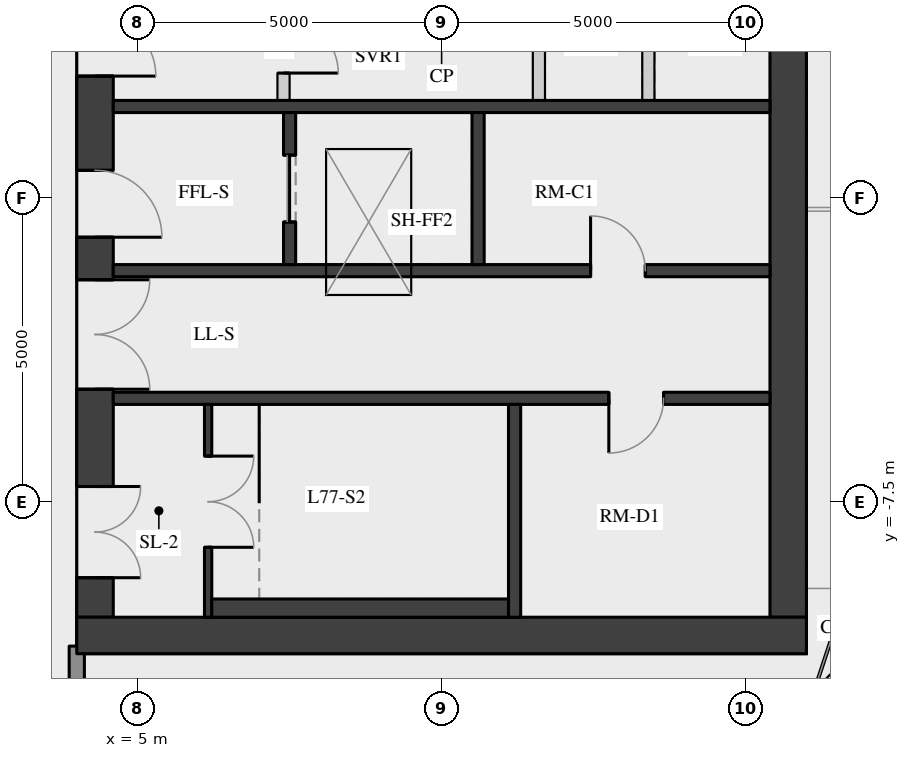
"""IFC4 building model, lengths in metres.
Left out: names, types, materials, properties, quantities, classifications, styles, units other than length and angle.
Written with IfcOpenShell. Run it as: python <this file> out.ifc"""

import sys

from ifc_helpers import new_model, si_unit, direction, frame, frame_2d, origin, place, context, subcontext, project, spatial, rectangle, extrude, element, fill, save


model = new_model("IFC4")
c1 = context("Model", 3, precision=1e-05, world=origin(), true_north=direction((0.0, 1.0)))
c2 = subcontext(c1, "Body", "Model", "MODEL_VIEW")
j1 = project(units=[si_unit("LENGTHUNIT", "METRE"), si_unit("PLANEANGLEUNIT", "RADIAN")], contexts=[c1])
p1 = place(None, origin())
s1 = spatial("IfcSite", under=j1, at=p1, CompositionType="ELEMENT")
p2 = place(p1, origin())
s2 = spatial("IfcBuilding", under=s1, at=p2, CompositionType="ELEMENT")
p3 = place(p2, frame((0.0, 0.0, 275.2)))
s3 = spatial("IfcBuildingStorey", under=s2, at=p3, CompositionType="ELEMENT", Elevation=275.2)
p4 = place(p3, frame((4.3, -9.4, 0.0), z_axis=(0.0, 0.0, 1.0), x_axis=(0.0, 1.0, 0.0)))
e1 = element("IfcWall", 1, at=p4, inside=s3, PredefinedType="SHEAR", context=c2, shape_type="SweptSolid", body=[
    extrude(rectangle(XDim=18.8, YDim=0.6, at=frame_2d((9.4, 0.0))), origin(), (0.0, 0.0, 1.0), 5.0),
])
p5 = place(p4, frame((0.65, 0.0, 0.0)))
e2 = element("IfcOpeningElement", 2, at=p5, cuts=e1, PredefinedType="OPENING", context=c2, shape_type="SweptSolid", body=[
    extrude(rectangle(XDim=1.5, YDim=2.1, at=frame_2d((0.75, 1.05))), frame((0.0, 0.31, 0.0), z_axis=(0.0, -1.0, 0.0), x_axis=(1.0, 0.0, 0.0)), (0.0, 0.0, 1.0), 0.62),
])
p6 = place(p4, frame((3.75, 0.0, 0.0)))
e3 = element("IfcOpeningElement", 3, at=p6, cuts=e1, PredefinedType="OPENING", context=c2, shape_type="SweptSolid", body=[
    extrude(rectangle(XDim=1.8, YDim=2.1, at=frame_2d((0.9, 1.05))), frame((0.0, 0.31, 0.0), z_axis=(0.0, -1.0, 0.0), x_axis=(1.0, 0.0, 0.0)), (0.0, 0.0, 1.0), 0.62),
])
p7 = place(p4, frame((6.25, 0.0, 0.0)))
e4 = element("IfcOpeningElement", 4, at=p7, cuts=e1, PredefinedType="OPENING", context=c2, shape_type="SweptSolid", body=[
    extrude(rectangle(XDim=1.1, YDim=2.1, at=frame_2d((0.55, 1.05))), frame((0.0, 0.31, 0.0), z_axis=(0.0, -1.0, 0.0), x_axis=(1.0, 0.0, 0.0)), (0.0, 0.0, 1.0), 0.62),
])
p8 = place(p4, frame((8.9, 0.0, 0.0)))
e5 = element("IfcOpeningElement", 5, at=p8, cuts=e1, PredefinedType="OPENING", context=c2, shape_type="SweptSolid", body=[
    extrude(rectangle(XDim=1.0, YDim=2.1, at=frame_2d((0.5, 1.05))), frame((0.0, 0.31, 0.0), z_axis=(0.0, -1.0, 0.0), x_axis=(1.0, 0.0, 0.0)), (0.0, 0.0, 1.0), 0.62),
])
p9 = place(p4, frame((11.45, 0.0, 0.0)))
e6 = element("IfcOpeningElement", 6, at=p9, cuts=e1, PredefinedType="OPENING", context=c2, shape_type="SweptSolid", body=[
    extrude(rectangle(XDim=1.1, YDim=2.1, at=frame_2d((0.55, 1.05))), frame((0.0, 0.31, 0.0), z_axis=(0.0, -1.0, 0.0), x_axis=(1.0, 0.0, 0.0)), (0.0, 0.0, 1.0), 0.62),
])
p10 = place(p4, frame((13.25, 0.0, 0.0)))
e7 = element("IfcOpeningElement", 7, at=p10, cuts=e1, PredefinedType="OPENING", context=c2, shape_type="SweptSolid", body=[
    extrude(rectangle(XDim=1.8, YDim=2.1, at=frame_2d((0.9, 1.05))), frame((0.0, 0.31, 0.0), z_axis=(0.0, -1.0, 0.0), x_axis=(1.0, 0.0, 0.0)), (0.0, 0.0, 1.0), 0.62),
])
p11 = place(p4, frame((16.65, 0.0, 0.0)))
e8 = element("IfcOpeningElement", 8, at=p11, cuts=e1, PredefinedType="OPENING", context=c2, shape_type="SweptSolid", body=[
    extrude(rectangle(XDim=1.5, YDim=2.1, at=frame_2d((0.75, 1.05))), frame((0.0, 0.31, 0.0), z_axis=(0.0, -1.0, 0.0), x_axis=(1.0, 0.0, 0.0)), (0.0, 0.0, 1.0), 0.62),
])
p12 = place(p3, frame((15.7, -9.4, 0.0), z_axis=(0.0, 0.0, 1.0), x_axis=(0.0, 1.0, 0.0)))
e9 = element("IfcWall", 9, at=p12, inside=s3, PredefinedType="SHEAR", context=c2, shape_type="SweptSolid", body=[
    extrude(rectangle(XDim=18.8, YDim=0.6, at=frame_2d((9.4, 0.0))), origin(), (0.0, 0.0, 1.0), 5.0),
])
p13 = place(p3, frame((4.0, -9.7, 0.0), z_axis=(0.0, 0.0, 1.0), x_axis=(1.0, 0.0, 0.0)))
e10 = element("IfcWall", 10, at=p13, inside=s3, PredefinedType="SHEAR", context=c2, shape_type="SweptSolid", body=[
    extrude(rectangle(XDim=12.0, YDim=0.6, at=frame_2d((6.0, 0.0))), origin(), (0.0, 0.0, 1.0), 5.0),
])
p14 = place(p3, frame((4.6, -1.0, 0.0), z_axis=(0.0, 0.0, 1.0), x_axis=(1.0, 0.0, 0.0)))
e11 = element("IfcWall", 11, at=p14, inside=s3, PredefinedType="SHEAR", context=c2, shape_type="SweptSolid", body=[
    extrude(rectangle(XDim=10.8, YDim=0.2, at=frame_2d((5.4, 0.0))), origin(), (0.0, 0.0, 1.0), 5.0),
])
p15 = place(p3, frame((4.6, -3.7, 0.0), z_axis=(0.0, 0.0, 1.0), x_axis=(1.0, 0.0, 0.0)))
e12 = element("IfcWall", 12, at=p15, inside=s3, PredefinedType="SHEAR", context=c2, shape_type="SweptSolid", body=[
    extrude(rectangle(XDim=10.8, YDim=0.2, at=frame_2d((5.4, 0.0))), origin(), (0.0, 0.0, 1.0), 5.0),
])
p16 = place(p15, frame((7.85, 0.0, 0.0)))
e13 = element("IfcOpeningElement", 13, at=p16, cuts=e12, PredefinedType="OPENING", context=c2, shape_type="SweptSolid", body=[
    extrude(rectangle(XDim=0.9, YDim=2.1, at=frame_2d((0.45, 1.05))), frame((0.0, 0.11, 0.0), z_axis=(0.0, -1.0, 0.0), x_axis=(1.0, 0.0, 0.0)), (0.0, 0.0, 1.0), 0.22),
])
p17 = place(p3, frame((4.6, -5.8, 0.0), z_axis=(0.0, 0.0, 1.0), x_axis=(1.0, 0.0, 0.0)))
e14 = element("IfcWall", 14, at=p17, inside=s3, PredefinedType="SHEAR", context=c2, shape_type="SweptSolid", body=[
    extrude(rectangle(XDim=10.8, YDim=0.2, at=frame_2d((5.4, 0.0))), origin(), (0.0, 0.0, 1.0), 5.0),
])
p18 = place(p17, frame((8.15, 0.0, 0.0)))
e15 = element("IfcOpeningElement", 15, at=p18, cuts=e14, PredefinedType="OPENING", context=c2, shape_type="SweptSolid", body=[
    extrude(rectangle(XDim=0.9, YDim=2.1, at=frame_2d((0.45, 1.05))), frame((0.0, 0.11, 0.0), z_axis=(0.0, -1.0, 0.0), x_axis=(1.0, 0.0, 0.0)), (0.0, 0.0, 1.0), 0.22),
])
p19 = place(p3, frame((11.2, -9.4, 0.0), z_axis=(0.0, 0.0, 1.0), x_axis=(0.0, 1.0, 0.0)))
e16 = element("IfcWall", 16, at=p19, inside=s3, PredefinedType="SHEAR", context=c2, shape_type="SweptSolid", body=[
    extrude(rectangle(XDim=3.5, YDim=0.2, at=frame_2d((1.75, 0.0))), origin(), (0.0, 0.0, 1.0), 5.0),
])
p20 = place(p3, frame((7.5, -3.6, 0.0), z_axis=(0.0, 0.0, 1.0), x_axis=(0.0, 1.0, 0.0)))
e17 = element("IfcWall", 17, at=p20, inside=s3, PredefinedType="SHEAR", context=c2, shape_type="SweptSolid", body=[
    extrude(rectangle(XDim=2.5, YDim=0.2, at=frame_2d((1.25, 0.0))), origin(), (0.0, 0.0, 1.0), 5.0),
])
p21 = place(p20, frame((0.7, 0.0, 0.0)))
e18 = element("IfcOpeningElement", 18, at=p21, cuts=e17, PredefinedType="OPENING", context=c2, shape_type="SweptSolid", body=[
    extrude(rectangle(XDim=1.1, YDim=2.1, at=frame_2d((0.55, 1.05))), frame((0.0, 0.11, 0.0), z_axis=(0.0, -1.0, 0.0), x_axis=(1.0, 0.0, 0.0)), (0.0, 0.0, 1.0), 0.22),
])
p22 = place(p3, frame((10.6, -3.6, 0.0), z_axis=(0.0, 0.0, 1.0), x_axis=(0.0, 1.0, 0.0)))
e19 = element("IfcWall", 19, at=p22, inside=s3, PredefinedType="SHEAR", context=c2, shape_type="SweptSolid", body=[
    extrude(rectangle(XDim=2.5, YDim=0.2, at=frame_2d((1.25, 0.0))), origin(), (0.0, 0.0, 1.0), 5.0),
])
p23 = place(p3, frame((6.16, -9.4, 0.0), z_axis=(0.0, 0.0, 1.0), x_axis=(0.0, 1.0, 0.0)))
e20 = element("IfcWall", 20, at=p23, inside=s3, PredefinedType="SHEAR", context=c2, shape_type="SweptSolid", body=[
    extrude(rectangle(XDim=3.5, YDim=0.12, at=frame_2d((1.75, 0.0))), origin(), (0.0, 0.0, 1.0), 5.0),
])
p24 = place(p23, frame((1.15, 0.0, 0.0)))
e21 = element("IfcOpeningElement", 21, at=p24, cuts=e20, PredefinedType="OPENING", context=c2, shape_type="SweptSolid", body=[
    extrude(rectangle(XDim=1.5, YDim=2.1, at=frame_2d((0.75, 1.05))), frame((0.0, 0.07, 0.0), z_axis=(0.0, -1.0, 0.0), x_axis=(1.0, 0.0, 0.0)), (0.0, 0.0, 1.0), 0.14),
])
p25 = place(p3, frame((7.4, -0.9, 0.0), z_axis=(0.0, 0.0, 1.0), x_axis=(0.0, 1.0, 0.0)))
e22 = element("IfcWall", 22, at=p25, inside=s3, PredefinedType="PARTITIONING", context=c2, shape_type="SweptSolid", body=[
    extrude(rectangle(XDim=1.8, YDim=0.2, at=frame_2d((0.9, 0.0))), origin(), (0.0, 0.0, 1.0), 5.0),
])
p26 = place(p25, frame((0.45, 0.0, 0.0)))
e23 = element("IfcOpeningElement", 23, at=p26, cuts=e22, PredefinedType="OPENING", context=c2, shape_type="SweptSolid", body=[
    extrude(rectangle(XDim=0.9, YDim=2.1, at=frame_2d((0.45, 1.05))), frame((0.0, 0.11, 0.0), z_axis=(0.0, -1.0, 0.0), x_axis=(1.0, 0.0, 0.0)), (0.0, 0.0, 1.0), 0.22),
])
for number, where, z_axis, x_axis in (
    (24, (11.6, -0.9, 0.0), (0.0, 0.0, 1.0), (0.0, 1.0, 0.0)),
    (25, (13.4, -0.9, 0.0), (0.0, 0.0, 1.0), (0.0, 1.0, 0.0)),
):
    element("IfcWall", number, at=place(p3, frame(where, z_axis=z_axis, x_axis=x_axis)), inside=s3, PredefinedType="PARTITIONING", context=c2, shape_type="SweptSolid", body=[
        extrude(rectangle(XDim=1.8, YDim=0.2, at=frame_2d((0.9, 0.0))), origin(), (0.0, 0.0, 1.0), 5.0),
    ])
p27 = place(p3, frame((6.22, -9.25, 0.0), z_axis=(0.0, 0.0, 1.0), x_axis=(1.0, 0.0, 0.0)))
e26 = element("IfcWall", 26, at=p27, inside=s3, PredefinedType="PARTITIONING", context=c2, shape_type="SweptSolid", body=[
    extrude(rectangle(XDim=4.88, YDim=0.3, at=frame_2d((2.44, 0.0))), origin(), (0.0, 0.0, 1.0), 5.0),
])
p28 = place(p3, frame((4.0, -13.875, 0.0), z_axis=(0.0, 0.0, 1.0), x_axis=(0.0, 1.0, 0.0)))
e27 = element("IfcWall", 27, at=p28, inside=s3, PredefinedType="PARTITIONING", context=c2, shape_type="SweptSolid", body=[
    extrude(rectangle(XDim=4.0, YDim=0.25, at=frame_2d((2.0, 0.0))), origin(), (0.0, 0.0, 1.0), 6.0),
])
p29 = place(p5, origin())
e28 = element("IfcDoor", 28, at=p29, inside=s3, OperationType="DOUBLE_DOOR_SINGLE_SWING", PredefinedType="DOOR", context=c2, shape_type="SweptSolid", body=[
    extrude(rectangle(XDim=1.5, YDim=2.1, at=frame_2d((0.75, 1.05))), frame((0.0, 0.025, 0.0), z_axis=(0.0, -1.0, 0.0), x_axis=(1.0, 0.0, 0.0)), (0.0, 0.0, 1.0), 0.05),
])
fill(e2, e28)
p30 = place(p6, origin())
e29 = element("IfcDoor", 29, at=p30, inside=s3, OperationType="DOUBLE_DOOR_SINGLE_SWING", PredefinedType="DOOR", context=c2, shape_type="SweptSolid", body=[
    extrude(rectangle(XDim=1.8, YDim=2.1, at=frame_2d((0.9, 1.05))), frame((0.0, 0.025, 0.0), z_axis=(0.0, -1.0, 0.0), x_axis=(1.0, 0.0, 0.0)), (0.0, 0.0, 1.0), 0.05),
])
fill(e3, e29)
p31 = place(p7, origin())
e30 = element("IfcDoor", 30, at=p31, inside=s3, OperationType="SINGLE_SWING_RIGHT", PredefinedType="DOOR", context=c2, shape_type="SweptSolid", body=[
    extrude(rectangle(XDim=1.1, YDim=2.1, at=frame_2d((0.55, 1.05))), frame((0.0, 0.025, 0.0), z_axis=(0.0, -1.0, 0.0), x_axis=(1.0, 0.0, 0.0)), (0.0, 0.0, 1.0), 0.05),
])
fill(e4, e30)
p32 = place(p8, origin())
e31 = element("IfcDoor", 31, at=p32, inside=s3, OperationType="SINGLE_SWING_RIGHT", PredefinedType="DOOR", context=c2, shape_type="SweptSolid", body=[
    extrude(rectangle(XDim=1.0, YDim=2.1, at=frame_2d((0.5, 1.05))), frame((0.0, 0.025, 0.0), z_axis=(0.0, -1.0, 0.0), x_axis=(1.0, 0.0, 0.0)), (0.0, 0.0, 1.0), 0.05),
])
fill(e5, e31)
p33 = place(p24, origin())
e32 = element("IfcDoor", 32, at=p33, inside=s3, OperationType="DOUBLE_DOOR_SINGLE_SWING", PredefinedType="DOOR", context=c2, shape_type="SweptSolid", body=[
    extrude(rectangle(XDim=1.5, YDim=2.1, at=frame_2d((0.75, 1.05))), frame((0.0, 0.025, 0.0), z_axis=(0.0, -1.0, 0.0), x_axis=(1.0, 0.0, 0.0)), (0.0, 0.0, 1.0), 0.05),
])
fill(e21, e32)
p34 = place(p16, origin())
e33 = element("IfcDoor", 33, at=p34, inside=s3, OperationType="SINGLE_SWING_LEFT", PredefinedType="DOOR", context=c2, shape_type="SweptSolid", body=[
    extrude(rectangle(XDim=0.9, YDim=2.1, at=frame_2d((0.45, 1.05))), frame((0.0, 0.025, 0.0), z_axis=(0.0, -1.0, 0.0), x_axis=(1.0, 0.0, 0.0)), (0.0, 0.0, 1.0), 0.05),
])
fill(e13, e33)
p35 = place(p18, origin())
e34 = element("IfcDoor", 34, at=p35, inside=s3, OperationType="SINGLE_SWING_RIGHT", PredefinedType="DOOR", context=c2, shape_type="SweptSolid", body=[
    extrude(rectangle(XDim=0.9, YDim=2.1, at=frame_2d((0.45, 1.05))), frame((0.0, 0.025, 0.0), z_axis=(0.0, -1.0, 0.0), x_axis=(1.0, 0.0, 0.0)), (0.0, 0.0, 1.0), 0.05),
])
fill(e15, e34)
p36 = place(p21, origin())
e35 = element("IfcDoor", 35, at=p36, inside=s3, OperationType="DOUBLE_DOOR_SLIDING", PredefinedType="DOOR", context=c2, shape_type="SweptSolid", body=[
    extrude(rectangle(XDim=1.1, YDim=2.1, at=frame_2d((0.55, 1.05))), frame((0.0, 0.025, 0.0), z_axis=(0.0, -1.0, 0.0), x_axis=(1.0, 0.0, 0.0)), (0.0, 0.0, 1.0), 0.05),
])
fill(e18, e35)
p37 = place(p26, origin())
e36 = element("IfcDoor", 36, at=p37, inside=s3, OperationType="SINGLE_SWING_RIGHT", PredefinedType="DOOR", context=c2, shape_type="SweptSolid", body=[
    extrude(rectangle(XDim=0.9, YDim=2.1, at=frame_2d((0.45, 1.05))), frame((0.0, 0.025, 0.0), z_axis=(0.0, -1.0, 0.0), x_axis=(1.0, 0.0, 0.0)), (0.0, 0.0, 1.0), 0.05),
])
fill(e23, e36)
save(model, sys.argv[1])
